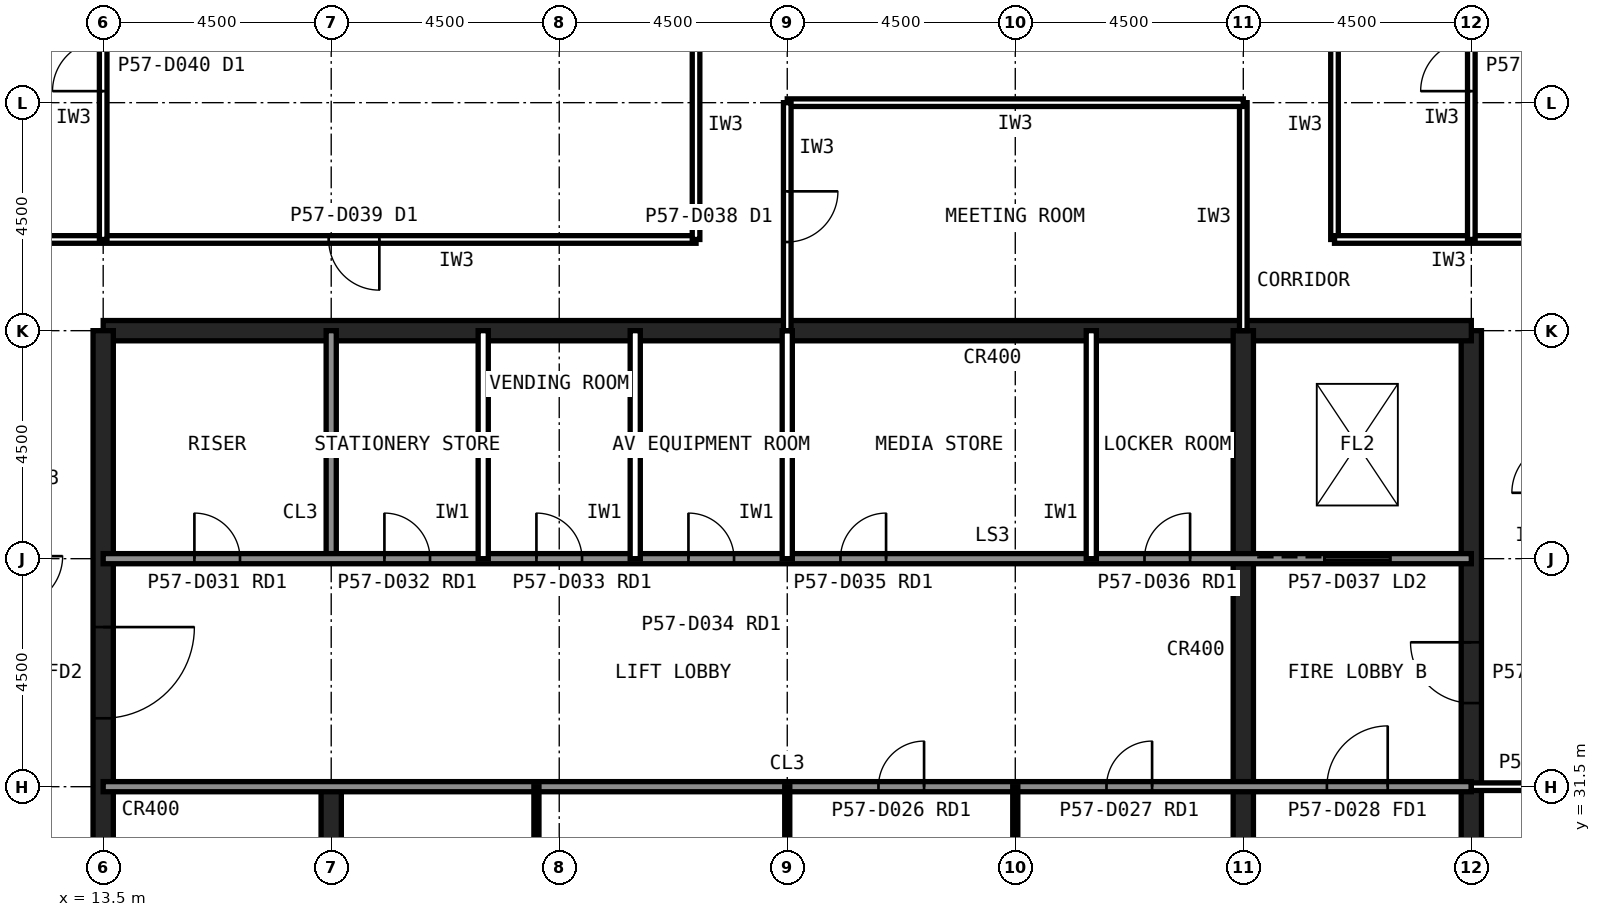
"""IFC4 building model, lengths in metres.
Left out: names, types, materials, properties, quantities, classifications, styles, units other than length and angle.
Written with IfcOpenShell. Run it as: python <this file> out.ifc"""

import sys

from ifc_helpers import new_model, si_unit, direction, frame, frame_2d, origin, place, context, subcontext, project, spatial, rectangle, extrude, element, fill, save


model = new_model("IFC4")
c1 = context("Model", 3, precision=1e-05, world=origin(), true_north=direction((0.0, 1.0)))
c2 = subcontext(c1, "Body", "Model", "MODEL_VIEW")
j1 = project(units=[si_unit("LENGTHUNIT", "METRE"), si_unit("PLANEANGLEUNIT", "RADIAN")], contexts=[c1])
p1 = place(None, origin())
s1 = spatial("IfcSite", under=j1, at=p1, CompositionType="ELEMENT")
p2 = place(p1, origin())
s2 = spatial("IfcBuilding", under=s1, at=p2, CompositionType="ELEMENT")
p3 = place(p2, frame((0.0, 0.0, 238.6)))
s3 = spatial("IfcBuildingStorey", under=s2, at=p3, CompositionType="ELEMENT", Elevation=238.6)
p4 = place(p3, frame((40.5, 13.5, 0.0), z_axis=(0.0, 0.0, 1.0), x_axis=(0.0, 1.0, 0.0)))
e1 = element("IfcWall", 1, at=p4, inside=s3, PredefinedType="SHEAR", context=c2, shape_type="SweptSolid", body=[
    extrude(rectangle(XDim=27.0, YDim=0.4, at=frame_2d((13.5, 0.0))), origin(), (0.0, 0.0, 1.0), 4.0),
])
p5 = place(p4, frame((5.85, 0.0, 0.0)))
e2 = element("IfcOpeningElement", 2, at=p5, cuts=e1, PredefinedType="OPENING", context=c2, shape_type="SweptSolid", body=[
    extrude(rectangle(XDim=1.8, YDim=2.1, at=frame_2d((0.9, 1.05))), frame((0.0, 0.21, 0.0), z_axis=(0.0, -1.0, 0.0), x_axis=(1.0, 0.0, 0.0)), (0.0, 0.0, 1.0), 0.42),
])
p6 = place(p4, frame((19.65, 0.0, 0.0)))
e3 = element("IfcOpeningElement", 3, at=p6, cuts=e1, PredefinedType="OPENING", context=c2, shape_type="SweptSolid", body=[
    extrude(rectangle(XDim=1.2, YDim=2.1, at=frame_2d((0.6, 1.05))), frame((0.0, 0.21, 0.0), z_axis=(0.0, -1.0, 0.0), x_axis=(1.0, 0.0, 0.0)), (0.0, 0.0, 1.0), 0.42),
])
p7 = place(p3, frame((40.5, 40.5, 0.0), z_axis=(0.0, 0.0, 1.0), x_axis=(-1.0, 0.0, 0.0)))
e4 = element("IfcWall", 4, at=p7, inside=s3, PredefinedType="SHEAR", context=c2, shape_type="SweptSolid", body=[
    extrude(rectangle(XDim=27.0, YDim=0.4, at=frame_2d((13.5, 0.0))), origin(), (0.0, 0.0, 1.0), 4.0),
])
p8 = place(p3, frame((13.5, 40.5, 0.0), z_axis=(0.0, 0.0, 1.0), x_axis=(0.0, -1.0, 0.0)))
e5 = element("IfcWall", 5, at=p8, inside=s3, PredefinedType="SHEAR", context=c2, shape_type="SweptSolid", body=[
    extrude(rectangle(XDim=27.0, YDim=0.4, at=frame_2d((13.5, 0.0))), origin(), (0.0, 0.0, 1.0), 4.0),
])
p9 = place(p8, frame((19.65, 0.0, 0.0)))
e6 = element("IfcOpeningElement", 6, at=p9, cuts=e5, PredefinedType="OPENING", context=c2, shape_type="SweptSolid", body=[
    extrude(rectangle(XDim=1.2, YDim=2.1, at=frame_2d((0.6, 1.05))), frame((0.0, 0.21, 0.0), z_axis=(0.0, -1.0, 0.0), x_axis=(1.0, 0.0, 0.0)), (0.0, 0.0, 1.0), 0.42),
])
p10 = place(p8, frame((5.85, 0.0, 0.0)))
e7 = element("IfcOpeningElement", 7, at=p10, cuts=e5, PredefinedType="OPENING", context=c2, shape_type="SweptSolid", body=[
    extrude(rectangle(XDim=1.8, YDim=2.1, at=frame_2d((0.9, 1.05))), frame((0.0, 0.21, 0.0), z_axis=(0.0, -1.0, 0.0), x_axis=(1.0, 0.0, 0.0)), (0.0, 0.0, 1.0), 0.42),
])
p11 = place(p3, frame((18.0, 13.5, 0.0), z_axis=(0.0, 0.0, 1.0), x_axis=(0.0, 1.0, 0.0)))
e8 = element("IfcWall", 8, at=p11, inside=s3, PredefinedType="SHEAR", context=c2, shape_type="SweptSolid", body=[
    extrude(rectangle(XDim=18.0, YDim=0.4, at=frame_2d((9.0, 0.0))), origin(), (0.0, 0.0, 1.0), 4.0),
])
p12 = place(p3, frame((18.0, 36.0, 0.0), z_axis=(0.0, 0.0, 1.0), x_axis=(0.0, 1.0, 0.0)))
e9 = element("IfcWall", 9, at=p12, inside=s3, PredefinedType="SOLIDWALL", context=c2, shape_type="SweptSolid", body=[
    extrude(rectangle(XDim=4.5, YDim=0.2, at=frame_2d((2.25, 0.0))), origin(), (0.0, 0.0, 1.0), 3.84),
])
p13 = place(p3, frame((36.0, 22.5, 0.0), z_axis=(0.0, 0.0, 1.0), x_axis=(0.0, 1.0, 0.0)))
e10 = element("IfcWall", 10, at=p13, inside=s3, PredefinedType="SHEAR", context=c2, shape_type="SweptSolid", body=[
    extrude(rectangle(XDim=18.0, YDim=0.4, at=frame_2d((9.0, 0.0))), origin(), (0.0, 0.0, 1.0), 4.0),
])
p14 = place(p3, frame((13.5, 36.0, 0.0), z_axis=(0.0, 0.0, 1.0), x_axis=(1.0, 0.0, 0.0)))
e11 = element("IfcWall", 11, at=p14, inside=s3, PredefinedType="SOLIDWALL", context=c2, shape_type="SweptSolid", body=[
    extrude(rectangle(XDim=27.0, YDim=0.2, at=frame_2d((13.5, 0.0))), origin(), (0.0, 0.0, 1.0), 3.84),
])
p15 = place(p14, frame((1.8, 0.0, 0.0)))
e12 = element("IfcOpeningElement", 12, at=p15, cuts=e11, PredefinedType="OPENING", context=c2, shape_type="SweptSolid", body=[
    extrude(rectangle(XDim=0.9, YDim=2.1, at=frame_2d((0.45, 1.05))), frame((0.0, 0.11, 0.0), z_axis=(0.0, -1.0, 0.0), x_axis=(1.0, 0.0, 0.0)), (0.0, 0.0, 1.0), 0.22),
])
p16 = place(p14, frame((5.55, 0.0, 0.0)))
e13 = element("IfcOpeningElement", 13, at=p16, cuts=e11, PredefinedType="OPENING", context=c2, shape_type="SweptSolid", body=[
    extrude(rectangle(XDim=0.9, YDim=2.1, at=frame_2d((0.45, 1.05))), frame((0.0, 0.11, 0.0), z_axis=(0.0, -1.0, 0.0), x_axis=(1.0, 0.0, 0.0)), (0.0, 0.0, 1.0), 0.22),
])
p17 = place(p14, frame((14.55, 0.0, 0.0)))
e14 = element("IfcOpeningElement", 14, at=p17, cuts=e11, PredefinedType="OPENING", context=c2, shape_type="SweptSolid", body=[
    extrude(rectangle(XDim=0.9, YDim=2.1, at=frame_2d((0.45, 1.05))), frame((0.0, 0.11, 0.0), z_axis=(0.0, -1.0, 0.0), x_axis=(1.0, 0.0, 0.0)), (0.0, 0.0, 1.0), 0.22),
])
p18 = place(p14, frame((17.55, 0.0, 0.0)))
e15 = element("IfcOpeningElement", 15, at=p18, cuts=e11, PredefinedType="OPENING", context=c2, shape_type="SweptSolid", body=[
    extrude(rectangle(XDim=0.9, YDim=2.1, at=frame_2d((0.45, 1.05))), frame((0.0, 0.11, 0.0), z_axis=(0.0, -1.0, 0.0), x_axis=(1.0, 0.0, 0.0)), (0.0, 0.0, 1.0), 0.22),
])
p19 = place(p14, frame((20.55, 0.0, 0.0)))
e16 = element("IfcOpeningElement", 16, at=p19, cuts=e11, PredefinedType="OPENING", context=c2, shape_type="SweptSolid", body=[
    extrude(rectangle(XDim=0.9, YDim=2.1, at=frame_2d((0.45, 1.05))), frame((0.0, 0.11, 0.0), z_axis=(0.0, -1.0, 0.0), x_axis=(1.0, 0.0, 0.0)), (0.0, 0.0, 1.0), 0.22),
])
p20 = place(p14, frame((24.1, 0.0, 0.0)))
e17 = element("IfcOpeningElement", 17, at=p20, cuts=e11, PredefinedType="OPENING", context=c2, shape_type="SweptSolid", body=[
    extrude(rectangle(XDim=1.3, YDim=2.2, at=frame_2d((0.65, 1.1))), frame((0.0, 0.11, 0.0), z_axis=(0.0, -1.0, 0.0), x_axis=(1.0, 0.0, 0.0)), (0.0, 0.0, 1.0), 0.22),
])
p21 = place(p3, frame((13.5, 31.5, 0.0), z_axis=(0.0, 0.0, 1.0), x_axis=(1.0, 0.0, 0.0)))
e18 = element("IfcWall", 18, at=p21, inside=s3, PredefinedType="SOLIDWALL", context=c2, shape_type="SweptSolid", body=[
    extrude(rectangle(XDim=27.0, YDim=0.2, at=frame_2d((13.5, 0.0))), origin(), (0.0, 0.0, 1.0), 3.84),
])
p22 = place(p21, frame((24.15, 0.0, 0.0)))
e19 = element("IfcOpeningElement", 19, at=p22, cuts=e18, PredefinedType="OPENING", context=c2, shape_type="SweptSolid", body=[
    extrude(rectangle(XDim=1.2, YDim=2.1, at=frame_2d((0.6, 1.05))), frame((0.0, 0.11, 0.0), z_axis=(0.0, -1.0, 0.0), x_axis=(1.0, 0.0, 0.0)), (0.0, 0.0, 1.0), 0.22),
])
p23 = place(p21, frame((15.3, 0.0, 0.0)))
e20 = element("IfcOpeningElement", 20, at=p23, cuts=e18, PredefinedType="OPENING", context=c2, shape_type="SweptSolid", body=[
    extrude(rectangle(XDim=0.9, YDim=2.1, at=frame_2d((0.45, 1.05))), frame((0.0, 0.11, 0.0), z_axis=(0.0, -1.0, 0.0), x_axis=(1.0, 0.0, 0.0)), (0.0, 0.0, 1.0), 0.22),
])
p24 = place(p21, frame((19.8, 0.0, 0.0)))
e21 = element("IfcOpeningElement", 21, at=p24, cuts=e18, PredefinedType="OPENING", context=c2, shape_type="SweptSolid", body=[
    extrude(rectangle(XDim=0.9, YDim=2.1, at=frame_2d((0.45, 1.05))), frame((0.0, 0.11, 0.0), z_axis=(0.0, -1.0, 0.0), x_axis=(1.0, 0.0, 0.0)), (0.0, 0.0, 1.0), 0.22),
])
for number, where, z_axis, x_axis in (
    (22, (27.0, 36.0, 0.0), (0.0, 0.0, 1.0), (0.0, 1.0, 0.0)),
    (23, (30.0, 36.0, 0.0), (0.0, 0.0, 1.0), (0.0, 1.0, 0.0)),
    (24, (33.0, 36.0, 0.0), (0.0, 0.0, 1.0), (0.0, 1.0, 0.0)),
):
    element("IfcWall", number, at=place(p3, frame(where, z_axis=z_axis, x_axis=x_axis)), inside=s3, PredefinedType="PARTITIONING", context=c2, shape_type="SweptSolid", body=[
        extrude(rectangle(XDim=4.5, YDim=0.2, at=frame_2d((2.25, 0.0))), origin(), (0.0, 0.0, 1.0), 3.84),
    ])
for number, where, z_axis, x_axis in (
    (25, (22.05, 22.5, 0.0), (0.0, 0.0, 1.0), (0.0, 1.0, 0.0)),
    (26, (27.0, 22.5, 0.0), (0.0, 0.0, 1.0), (0.0, 1.0, 0.0)),
    (27, (31.5, 22.5, 0.0), (0.0, 0.0, 1.0), (0.0, 1.0, 0.0)),
):
    element("IfcWall", number, at=place(p3, frame(where, z_axis=z_axis, x_axis=x_axis)), inside=s3, PredefinedType="PLUMBINGWALL", context=c2, shape_type="SweptSolid", body=[
        extrude(rectangle(XDim=9.0, YDim=0.1, at=frame_2d((4.5, 0.0))), origin(), (0.0, 0.0, 1.0), 3.84),
    ])
p25 = place(p3, frame((25.2, 42.3, 0.0), z_axis=(0.0, 0.0, 1.0), x_axis=(-1.0, 0.0, 0.0)))
e28 = element("IfcWall", 28, at=p25, inside=s3, PredefinedType="PARTITIONING", context=c2, shape_type="SweptSolid", body=[
    extrude(rectangle(XDim=13.5, YDim=0.15, at=frame_2d((6.75, 0.0))), origin(), (0.0, 0.0, 1.0), 3.84),
])
p26 = place(p25, frame((6.25, 0.0, 0.0)))
e29 = element("IfcOpeningElement", 29, at=p26, cuts=e28, PredefinedType="OPENING", context=c2, shape_type="SweptSolid", body=[
    extrude(rectangle(XDim=1.0, YDim=2.1, at=frame_2d((0.5, 1.05))), frame((0.0, 0.085, 0.0), z_axis=(0.0, -1.0, 0.0), x_axis=(1.0, 0.0, 0.0)), (0.0, 0.0, 1.0), 0.17),
])
for number, where, z_axis, x_axis in (
    (30, (25.2, 46.8, 0.0), (0.0, 0.0, 1.0), (0.0, -1.0, 0.0)),
    (31, (37.8, 42.3, 0.0), (0.0, 0.0, 1.0), (0.0, 1.0, 0.0)),
    (32, (42.3, 42.3, 0.0), (0.0, 0.0, 1.0), (-1.0, 0.0, 0.0)),
):
    element("IfcWall", number, at=place(p3, frame(where, z_axis=z_axis, x_axis=x_axis)), inside=s3, PredefinedType="PARTITIONING", context=c2, shape_type="SweptSolid", body=[
        extrude(rectangle(XDim=4.5, YDim=0.15, at=frame_2d((2.25, 0.0))), origin(), (0.0, 0.0, 1.0), 3.84),
    ])
p27 = place(p3, frame((36.0, 40.5, 0.0), z_axis=(0.0, 0.0, 1.0), x_axis=(0.0, 1.0, 0.0)))
e33 = element("IfcWall", 33, at=p27, inside=s3, PredefinedType="PARTITIONING", context=c2, shape_type="SweptSolid", body=[
    extrude(rectangle(XDim=4.5, YDim=0.15, at=frame_2d((2.25, 0.0))), origin(), (0.0, 0.0, 1.0), 2.989),
])
p28 = place(p3, frame((36.0, 45.0, 0.0), z_axis=(0.0, 0.0, 1.0), x_axis=(-1.0, 0.0, 0.0)))
e34 = element("IfcWall", 34, at=p28, inside=s3, PredefinedType="PARTITIONING", context=c2, shape_type="SweptSolid", body=[
    extrude(rectangle(XDim=9.0, YDim=0.15, at=frame_2d((4.5, 0.0))), origin(), (0.0, 0.0, 1.0), 3.84),
])
p29 = place(p3, frame((27.0, 45.0, 0.0), z_axis=(0.0, 0.0, 1.0), x_axis=(0.0, -1.0, 0.0)))
e35 = element("IfcWall", 35, at=p29, inside=s3, PredefinedType="PARTITIONING", context=c2, shape_type="SweptSolid", body=[
    extrude(rectangle(XDim=4.5, YDim=0.15, at=frame_2d((2.25, 0.0))), origin(), (0.0, 0.0, 1.0), 2.989),
])
p30 = place(p29, frame((1.75, 0.0, 0.0)))
e36 = element("IfcOpeningElement", 36, at=p30, cuts=e35, PredefinedType="OPENING", context=c2, shape_type="SweptSolid", body=[
    extrude(rectangle(XDim=1.0, YDim=2.1, at=frame_2d((0.5, 1.05))), frame((0.0, 0.085, 0.0), z_axis=(0.0, -1.0, 0.0), x_axis=(1.0, 0.0, 0.0)), (0.0, 0.0, 1.0), 0.17),
])
p31 = place(p3, frame((44.1, 31.5, 0.0), z_axis=(0.0, 0.0, 1.0), x_axis=(-1.0, 0.0, 0.0)))
e37 = element("IfcWall", 37, at=p31, inside=s3, PredefinedType="PARTITIONING", context=c2, shape_type="SweptSolid", body=[
    extrude(rectangle(XDim=3.6, YDim=0.15, at=frame_2d((1.8, 0.0))), origin(), (0.0, 0.0, 1.0), 2.989),
])
p32 = place(p31, frame((1.3, 0.0, 0.0)))
e38 = element("IfcOpeningElement", 38, at=p32, cuts=e37, PredefinedType="OPENING", context=c2, shape_type="SweptSolid", body=[
    extrude(rectangle(XDim=1.0, YDim=2.1, at=frame_2d((0.5, 1.05))), frame((0.0, 0.085, 0.0), z_axis=(0.0, -1.0, 0.0), x_axis=(1.0, 0.0, 0.0)), (0.0, 0.0, 1.0), 0.17),
])
p33 = place(p3, frame((13.5, 42.3, 0.0), z_axis=(0.0, 0.0, 1.0), x_axis=(0.0, 1.0, 0.0)))
e39 = element("IfcWall", 39, at=p33, inside=s3, PredefinedType="PARTITIONING", context=c2, shape_type="SweptSolid", body=[
    extrude(rectangle(XDim=6.855, YDim=0.15, at=frame_2d((3.427, 0.0))), origin(), (0.0, 0.0, 1.0), 2.989),
])
p34 = place(p33, frame((2.927, 0.0, 0.0)))
e40 = element("IfcOpeningElement", 40, at=p34, cuts=e39, PredefinedType="OPENING", context=c2, shape_type="SweptSolid", body=[
    extrude(rectangle(XDim=1.0, YDim=2.1, at=frame_2d((0.5, 1.05))), frame((0.0, 0.085, 0.0), z_axis=(0.0, -1.0, 0.0), x_axis=(1.0, 0.0, 0.0)), (0.0, 0.0, 1.0), 0.17),
])
p35 = place(p3, frame((40.5, 42.3, 0.0), z_axis=(0.0, 0.0, 1.0), x_axis=(0.0, 1.0, 0.0)))
e41 = element("IfcWall", 41, at=p35, inside=s3, PredefinedType="PARTITIONING", context=c2, shape_type="SweptSolid", body=[
    extrude(rectangle(XDim=6.855, YDim=0.15, at=frame_2d((3.427, 0.0))), origin(), (0.0, 0.0, 1.0), 2.989),
])
p36 = place(p35, frame((2.927, 0.0, 0.0)))
e42 = element("IfcOpeningElement", 42, at=p36, cuts=e41, PredefinedType="OPENING", context=c2, shape_type="SweptSolid", body=[
    extrude(rectangle(XDim=1.0, YDim=2.1, at=frame_2d((0.5, 1.05))), frame((0.0, 0.085, 0.0), z_axis=(0.0, -1.0, 0.0), x_axis=(1.0, 0.0, 0.0)), (0.0, 0.0, 1.0), 0.17),
])
p37 = place(p10, origin())
e43 = element("IfcDoor", 43, at=p37, inside=s3, OperationType="SINGLE_SWING_LEFT", PredefinedType="DOOR", context=c2, shape_type="SweptSolid", body=[
    extrude(rectangle(XDim=1.8, YDim=2.1, at=frame_2d((0.9, 1.05))), frame((0.0, 0.025, 0.0), z_axis=(0.0, -1.0, 0.0), x_axis=(1.0, 0.0, 0.0)), (0.0, 0.0, 1.0), 0.05),
])
fill(e7, e43)
p38 = place(p6, origin())
e44 = element("IfcDoor", 44, at=p38, inside=s3, OperationType="SINGLE_SWING_RIGHT", PredefinedType="DOOR", context=c2, shape_type="SweptSolid", body=[
    extrude(rectangle(XDim=1.2, YDim=2.1, at=frame_2d((0.6, 1.05))), frame((0.0, 0.025, 0.0), z_axis=(0.0, -1.0, 0.0), x_axis=(1.0, 0.0, 0.0)), (0.0, 0.0, 1.0), 0.05),
])
fill(e3, e44)
p39 = place(p22, origin())
e45 = element("IfcDoor", 45, at=p39, inside=s3, OperationType="SINGLE_SWING_RIGHT", PredefinedType="DOOR", context=c2, shape_type="SweptSolid", body=[
    extrude(rectangle(XDim=1.2, YDim=2.1, at=frame_2d((0.6, 1.05))), frame((0.0, 0.025, 0.0), z_axis=(0.0, -1.0, 0.0), x_axis=(1.0, 0.0, 0.0)), (0.0, 0.0, 1.0), 0.05),
])
fill(e19, e45)
p40 = place(p23, origin())
e46 = element("IfcDoor", 46, at=p40, inside=s3, OperationType="SINGLE_SWING_RIGHT", PredefinedType="DOOR", context=c2, shape_type="SweptSolid", body=[
    extrude(rectangle(XDim=0.9, YDim=2.1, at=frame_2d((0.45, 1.05))), frame((0.0, 0.025, 0.0), z_axis=(0.0, -1.0, 0.0), x_axis=(1.0, 0.0, 0.0)), (0.0, 0.0, 1.0), 0.05),
])
fill(e20, e46)
p41 = place(p24, origin())
e47 = element("IfcDoor", 47, at=p41, inside=s3, OperationType="SINGLE_SWING_RIGHT", PredefinedType="DOOR", context=c2, shape_type="SweptSolid", body=[
    extrude(rectangle(XDim=0.9, YDim=2.1, at=frame_2d((0.45, 1.05))), frame((0.0, 0.025, 0.0), z_axis=(0.0, -1.0, 0.0), x_axis=(1.0, 0.0, 0.0)), (0.0, 0.0, 1.0), 0.05),
])
fill(e21, e47)
p42 = place(p15, origin())
e48 = element("IfcDoor", 48, at=p42, inside=s3, OperationType="SINGLE_SWING_LEFT", PredefinedType="DOOR", context=c2, shape_type="SweptSolid", body=[
    extrude(rectangle(XDim=0.9, YDim=2.1, at=frame_2d((0.45, 1.05))), frame((0.0, 0.025, 0.0), z_axis=(0.0, -1.0, 0.0), x_axis=(1.0, 0.0, 0.0)), (0.0, 0.0, 1.0), 0.05),
])
fill(e12, e48)
p43 = place(p16, origin())
e49 = element("IfcDoor", 49, at=p43, inside=s3, OperationType="SINGLE_SWING_LEFT", PredefinedType="DOOR", context=c2, shape_type="SweptSolid", body=[
    extrude(rectangle(XDim=0.9, YDim=2.1, at=frame_2d((0.45, 1.05))), frame((0.0, 0.025, 0.0), z_axis=(0.0, -1.0, 0.0), x_axis=(1.0, 0.0, 0.0)), (0.0, 0.0, 1.0), 0.05),
])
fill(e13, e49)
p44 = place(p17, origin())
e50 = element("IfcDoor", 50, at=p44, inside=s3, OperationType="SINGLE_SWING_RIGHT", PredefinedType="DOOR", context=c2, shape_type="SweptSolid", body=[
    extrude(rectangle(XDim=0.9, YDim=2.1, at=frame_2d((0.45, 1.05))), frame((0.0, 0.025, 0.0), z_axis=(0.0, -1.0, 0.0), x_axis=(1.0, 0.0, 0.0)), (0.0, 0.0, 1.0), 0.05),
])
fill(e14, e50)
p45 = place(p18, origin())
e51 = element("IfcDoor", 51, at=p45, inside=s3, OperationType="SINGLE_SWING_RIGHT", PredefinedType="DOOR", context=c2, shape_type="SweptSolid", body=[
    extrude(rectangle(XDim=0.9, YDim=2.1, at=frame_2d((0.45, 1.05))), frame((0.0, 0.025, 0.0), z_axis=(0.0, -1.0, 0.0), x_axis=(1.0, 0.0, 0.0)), (0.0, 0.0, 1.0), 0.05),
])
fill(e15, e51)
p46 = place(p19, origin())
e52 = element("IfcDoor", 52, at=p46, inside=s3, OperationType="SINGLE_SWING_RIGHT", PredefinedType="DOOR", context=c2, shape_type="SweptSolid", body=[
    extrude(rectangle(XDim=0.9, YDim=2.1, at=frame_2d((0.45, 1.05))), frame((0.0, 0.025, 0.0), z_axis=(0.0, -1.0, 0.0), x_axis=(1.0, 0.0, 0.0)), (0.0, 0.0, 1.0), 0.05),
])
fill(e16, e52)
p47 = place(p20, origin())
e53 = element("IfcDoor", 53, at=p47, inside=s3, OperationType="SLIDING_TO_LEFT", PredefinedType="DOOR", context=c2, shape_type="SweptSolid", body=[
    extrude(rectangle(XDim=1.3, YDim=2.2, at=frame_2d((0.65, 1.1))), frame((0.0, 0.025, 0.0), z_axis=(0.0, -1.0, 0.0), x_axis=(1.0, 0.0, 0.0)), (0.0, 0.0, 1.0), 0.05),
])
fill(e17, e53)
p48 = place(p26, origin())
e54 = element("IfcDoor", 54, at=p48, inside=s3, OperationType="SINGLE_SWING_LEFT", PredefinedType="DOOR", context=c2, shape_type="SweptSolid", body=[
    extrude(rectangle(XDim=1.0, YDim=2.1, at=frame_2d((0.5, 1.05))), frame((0.0, 0.025, 0.0), z_axis=(0.0, -1.0, 0.0), x_axis=(1.0, 0.0, 0.0)), (0.0, 0.0, 1.0), 0.05),
])
fill(e29, e54)
p49 = place(p30, origin())
e55 = element("IfcDoor", 55, at=p49, inside=s3, OperationType="SINGLE_SWING_LEFT", PredefinedType="DOOR", context=c2, shape_type="SweptSolid", body=[
    extrude(rectangle(XDim=1.0, YDim=2.1, at=frame_2d((0.5, 1.05))), frame((0.0, 0.025, 0.0), z_axis=(0.0, -1.0, 0.0), x_axis=(1.0, 0.0, 0.0)), (0.0, 0.0, 1.0), 0.05),
])
fill(e36, e55)
p50 = place(p34, origin())
e56 = element("IfcDoor", 56, at=p50, inside=s3, OperationType="SINGLE_SWING_LEFT", PredefinedType="DOOR", context=c2, shape_type="SweptSolid", body=[
    extrude(rectangle(XDim=1.0, YDim=2.1, at=frame_2d((0.5, 1.05))), frame((0.0, 0.025, 0.0), z_axis=(0.0, -1.0, 0.0), x_axis=(1.0, 0.0, 0.0)), (0.0, 0.0, 1.0), 0.05),
])
fill(e40, e56)
p51 = place(p36, origin())
e57 = element("IfcDoor", 57, at=p51, inside=s3, OperationType="SINGLE_SWING_LEFT", PredefinedType="DOOR", context=c2, shape_type="SweptSolid", body=[
    extrude(rectangle(XDim=1.0, YDim=2.1, at=frame_2d((0.5, 1.05))), frame((0.0, 0.025, 0.0), z_axis=(0.0, -1.0, 0.0), x_axis=(1.0, 0.0, 0.0)), (0.0, 0.0, 1.0), 0.05),
])
fill(e42, e57)
save(model, sys.argv[1])
